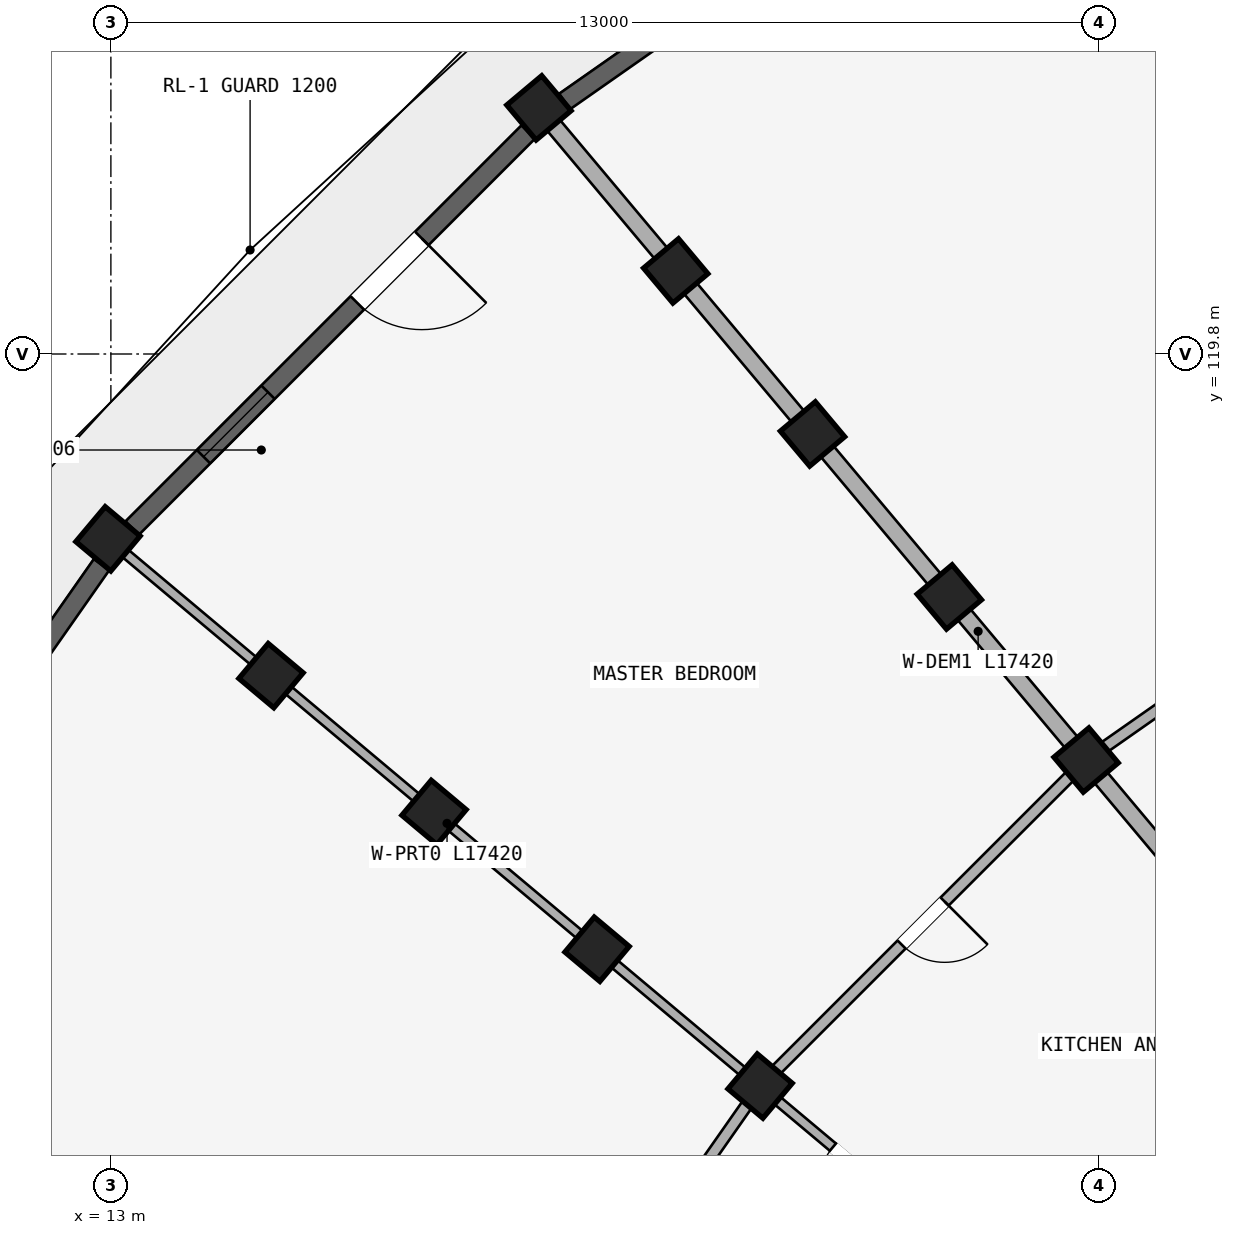
"""IFC4 building model, lengths in metres.
Left out: names, types, materials, properties, quantities, classifications, styles, units other than length and angle.
Written with IfcOpenShell. Run it as: python <this file> out.ifc"""

import sys

from ifc_helpers import new_model, si_unit, direction, frame, frame_2d, origin, origin_2d, place, context, subcontext, project, spatial, rectangle, extrude, element, fill, save


model = new_model("IFC4")
c1 = context("Model", 3, precision=1e-05, world=origin(), true_north=direction((0.0, 1.0)))
c2 = subcontext(c1, "Body", "Model", "MODEL_VIEW")
j1 = project(units=[si_unit("LENGTHUNIT", "METRE"), si_unit("PLANEANGLEUNIT", "RADIAN")], contexts=[c1])
p1 = place(None, origin())
s1 = spatial("IfcSite", under=j1, at=p1, CompositionType="ELEMENT")
p2 = place(p1, origin())
s2 = spatial("IfcBuilding", under=s1, at=p2, CompositionType="ELEMENT")
p3 = place(p2, frame((0.0, 0.0, 37.05)))
s3 = spatial("IfcBuildingStorey", under=s2, at=p3, CompositionType="ELEMENT", Elevation=37.05)
for number, where, z_axis, x_axis in (
    (1, (25.831, 114.458, 0.0), (0.0, 0.0, 1.0), (0.766, 0.643, 0.0)),
    (2, (24.031, 116.603, 0.0), (0.0, 0.0, 1.0), (0.766, 0.643, 0.0)),
    (3, (22.231, 118.748, 0.0), (0.0, 0.0, 1.0), (0.766, 0.643, 0.0)),
    (4, (20.432, 120.893, 0.0), (0.0, 0.0, 1.0), (0.766, 0.643, 0.0)),
):
    element("IfcColumn", number, at=place(p3, frame(where, z_axis=z_axis, x_axis=x_axis)), inside=s3, PredefinedType="COLUMN", context=c2, shape_type="SweptSolid", body=[
        extrude(rectangle(XDim=0.6, YDim=0.6, at=origin_2d()), origin(), (0.0, 0.0, 1.0), 2.93),
    ])
p4 = place(p3, frame((18.632, 123.038, 0.0), z_axis=(0.0, 0.0, 1.0), x_axis=(0.766044443119, 0.642787609687, 0.0)))
e5 = element("IfcColumn", 5, at=p4, inside=s3, PredefinedType="COLUMN", context=c2, shape_type="SweptSolid", body=[
    extrude(rectangle(XDim=0.6, YDim=0.6, at=origin_2d()), origin(), (0.0, 0.0, 1.0), 2.97),
])
for number, where, z_axis, x_axis in (
    (6, (21.542, 110.169, 0.0), (0.0, 0.0, 1.0), (0.643, 0.766, 0.0)),
    (7, (19.397, 111.969, 0.0), (0.0, 0.0, 1.0), (0.643, 0.766, 0.0)),
    (8, (17.252, 113.769, 0.0), (0.0, 0.0, 1.0), (0.643, 0.766, 0.0)),
    (9, (15.107, 115.568, 0.0), (0.0, 0.0, 1.0), (0.643, 0.766, 0.0)),
):
    element("IfcColumn", number, at=place(p3, frame(where, z_axis=z_axis, x_axis=x_axis)), inside=s3, PredefinedType="COLUMN", context=c2, shape_type="SweptSolid", body=[
        extrude(rectangle(XDim=0.6, YDim=0.6, at=origin_2d()), origin(), (0.0, 0.0, 1.0), 2.93),
    ])
p5 = place(p3, frame((12.962, 117.368, 0.0), z_axis=(0.0, 0.0, 1.0), x_axis=(0.642787609687, 0.766044443119, 0.0)))
e10 = element("IfcColumn", 10, at=p5, inside=s3, PredefinedType="COLUMN", context=c2, shape_type="SweptSolid", body=[
    extrude(rectangle(XDim=0.6, YDim=0.6, at=origin_2d()), origin(), (0.0, 0.0, 1.0), 2.97),
])
p6 = place(p3, frame((30.073, 109.402, 0.0), z_axis=(0.0, 0.0, 1.0), x_axis=(-0.707106781187, -0.707106781187, 0.0)))
e11 = element("IfcWall", 11, at=p6, inside=s3, PredefinedType="STANDARD", context=c2, shape_type="SweptSolid", body=[
    extrude(rectangle(XDim=4.916, YDim=0.2, at=frame_2d((2.458, 0.0))), origin(), (0.0, 0.0, 1.0), 2.372),
])
p7 = place(p6, frame((1.888, 0.0, 0.0)))
e12 = element("IfcOpeningElement", 12, at=p7, cuts=e11, PredefinedType="OPENING", context=c2, shape_type="SweptSolid", body=[
    extrude(rectangle(XDim=1.14, YDim=2.15, at=frame_2d((0.57, 1.075))), frame((0.0, 0.11, 0.0), z_axis=(0.0, -1.0, 0.0), x_axis=(1.0, 0.0, 0.0)), (0.0, 0.0, 1.0), 0.22),
])
p8 = place(p3, frame((34.05, 112.309, 0.0), z_axis=(0.0, 0.0, 1.0), x_axis=(-0.499997843263, 0.866026648973, 0.0)))
e13 = element("IfcWall", 13, at=p8, inside=s3, PredefinedType="PARTITIONING", context=c2, shape_type="SweptSolid", body=[
    extrude(rectangle(XDim=17.42, YDim=0.125, at=frame_2d((8.71, 0.0))), origin(), (0.0, 0.0, 1.0), 2.372),
])
p9 = place(p8, frame((4.45, 0.0, 0.0)))
e14 = element("IfcOpeningElement", 14, at=p9, cuts=e13, PredefinedType="OPENING", context=c2, shape_type="SweptSolid", body=[
    extrude(rectangle(XDim=0.8, YDim=2.1, at=frame_2d((0.4, 1.05))), frame((0.0, 0.073, 0.0), z_axis=(0.0, -1.0, 0.0), x_axis=(1.0, 0.0, 0.0)), (0.0, 0.0, 1.0), 0.145),
])
p10 = place(p3, frame((30.009, 109.479, 0.0), z_axis=(0.0, 0.0, 1.0), x_axis=(-0.642784757967, 0.766046835987, 0.0)))
e15 = element("IfcWall", 15, at=p10, inside=s3, PredefinedType="STANDARD", context=c2, shape_type="SweptSolid", body=[
    extrude(rectangle(XDim=17.42, YDim=0.22, at=frame_2d((8.71, 0.0))), origin(), (0.0, 0.0, 1.0), 2.372),
])
p11 = place(p3, frame((26.521, 105.991, 0.0), z_axis=(0.0, 0.0, 1.0), x_axis=(-0.766046835987, 0.642784757967, 0.0)))
e16 = element("IfcWall", 16, at=p11, inside=s3, PredefinedType="PARTITIONING", context=c2, shape_type="SweptSolid", body=[
    extrude(rectangle(XDim=17.42, YDim=0.125, at=frame_2d((8.71, 0.0))), origin(), (0.0, 0.0, 1.0), 2.372),
])
p12 = place(p11, frame((4.45, 0.0, 0.0)))
e17 = element("IfcOpeningElement", 17, at=p12, cuts=e16, PredefinedType="OPENING", context=c2, shape_type="SweptSolid", body=[
    extrude(rectangle(XDim=0.8, YDim=2.1, at=frame_2d((0.4, 1.05))), frame((0.0, 0.073, 0.0), z_axis=(0.0, -1.0, 0.0), x_axis=(1.0, 0.0, 0.0)), (0.0, 0.0, 1.0), 0.145),
])
p13 = place(p3, frame((23.691, 101.95, 0.0), z_axis=(0.0, 0.0, 1.0), x_axis=(-0.866026648973, 0.499997843263, 0.0)))
e18 = element("IfcWall", 18, at=p13, inside=s3, PredefinedType="STANDARD", context=c2, shape_type="SweptSolid", body=[
    extrude(rectangle(XDim=17.42, YDim=0.22, at=frame_2d((8.71, 0.0))), origin(), (0.0, 0.0, 1.0), 2.372),
])
p14 = place(p3, frame((30.8, 117.938, 0.0), z_axis=(0.0, 0.0, 1.0), x_axis=(-0.81913926159, -0.573594691504, 0.0)))
e19 = element("IfcWall", 19, at=p14, inside=s3, PredefinedType="PLUMBINGWALL", context=c2, shape_type="SweptSolid", body=[
    extrude(rectangle(XDim=6.066, YDim=0.15, at=frame_2d((3.033, 0.0))), origin(), (0.0, 0.0, 1.0), 2.372),
])
p15 = place(p14, frame((2.653, 0.0, 0.0)))
e20 = element("IfcOpeningElement", 20, at=p15, cuts=e19, PredefinedType="OPENING", context=c2, shape_type="SweptSolid", body=[
    extrude(rectangle(XDim=0.76, YDim=2.05, at=frame_2d((0.38, 1.025))), frame((0.0, 0.085, 0.0), z_axis=(0.0, -1.0, 0.0), x_axis=(1.0, 0.0, 0.0)), (0.0, 0.0, 1.0), 0.17),
])
p16 = place(p3, frame((25.831, 114.458, 0.0), z_axis=(0.0, 0.0, 1.0), x_axis=(-0.707106781187, -0.707106781187, 0.0)))
e21 = element("IfcWall", 21, at=p16, inside=s3, PredefinedType="PLUMBINGWALL", context=c2, shape_type="SweptSolid", body=[
    extrude(rectangle(XDim=6.066, YDim=0.15, at=frame_2d((3.033, 0.0))), origin(), (0.0, 0.0, 1.0), 2.372),
])
p17 = place(p16, frame((2.633, 0.0, 0.0)))
e22 = element("IfcOpeningElement", 22, at=p17, cuts=e21, PredefinedType="OPENING", context=c2, shape_type="SweptSolid", body=[
    extrude(rectangle(XDim=0.8, YDim=2.1, at=frame_2d((0.4, 1.05))), frame((0.0, 0.085, 0.0), z_axis=(0.0, -1.0, 0.0), x_axis=(1.0, 0.0, 0.0)), (0.0, 0.0, 1.0), 0.17),
])
p18 = place(p3, frame((21.542, 110.169, 0.0), z_axis=(0.0, 0.0, 1.0), x_axis=(-0.573594691504, -0.81913926159, 0.0)))
e23 = element("IfcWall", 23, at=p18, inside=s3, PredefinedType="PLUMBINGWALL", context=c2, shape_type="SweptSolid", body=[
    extrude(rectangle(XDim=6.066, YDim=0.15, at=frame_2d((3.033, 0.0))), origin(), (0.0, 0.0, 1.0), 2.372),
])
p19 = place(p18, frame((2.613, 0.0, 0.0)))
e24 = element("IfcOpeningElement", 24, at=p19, cuts=e23, PredefinedType="OPENING", context=c2, shape_type="SweptSolid", body=[
    extrude(rectangle(XDim=0.84, YDim=2.1, at=frame_2d((0.42, 1.05))), frame((0.0, 0.085, 0.0), z_axis=(0.0, -1.0, 0.0), x_axis=(1.0, 0.0, 0.0)), (0.0, 0.0, 1.0), 0.17),
])
p20 = place(p3, frame((25.005, 127.348, 0.0), z_axis=(0.0, 0.0, 1.0), x_axis=(-0.819147839112, -0.573582441919, 0.0)))
e25 = element("IfcWall", 25, at=p20, inside=s3, PredefinedType="STANDARD", context=c2, shape_type="SweptSolid", body=[
    extrude(rectangle(XDim=7.367, YDim=0.25, at=frame_2d((3.684, 0.0))), origin(), (0.0, 0.0, 1.0), 2.412),
])
p21 = place(p20, frame((2.783, 0.0, 0.562)))
e26 = element("IfcOpeningElement", 26, at=p21, cuts=e25, PredefinedType="OPENING", context=c2, shape_type="SweptSolid", body=[
    extrude(rectangle(XDim=1.8, YDim=1.65, at=frame_2d((0.9, 0.825))), frame((0.0, 0.135, 0.0), z_axis=(0.0, -1.0, 0.0), x_axis=(1.0, 0.0, 0.0)), (0.0, 0.0, 1.0), 0.27),
])
p22 = place(p3, frame((18.49, 122.719, 0.0), z_axis=(0.0, 0.0, 1.0), x_axis=(-0.707106781187, -0.707106781187, 0.0)))
e27 = element("IfcWall", 27, at=p22, inside=s3, PredefinedType="STANDARD", context=c2, shape_type="SweptSolid", body=[
    extrude(rectangle(XDim=7.367, YDim=0.25, at=frame_2d((3.684, 0.0))), origin(), (0.0, 0.0, 1.0), 2.412),
])
p23 = place(p22, frame((4.84, 0.0, 0.412)))
e28 = element("IfcOpeningElement", 28, at=p23, cuts=e27, PredefinedType="OPENING", context=c2, shape_type="SweptSolid", body=[
    extrude(rectangle(XDim=1.2, YDim=1.5, at=frame_2d((0.6, 0.75))), frame((0.0, 0.135, 0.0), z_axis=(0.0, -1.0, 0.0), x_axis=(1.0, 0.0, 0.0)), (0.0, 0.0, 1.0), 0.27),
])
p24 = place(p22, frame((1.979, 0.0, 0.0)))
e29 = element("IfcOpeningElement", 29, at=p24, cuts=e27, PredefinedType="OPENING", context=c2, shape_type="SweptSolid", body=[
    extrude(rectangle(XDim=1.2, YDim=2.15, at=frame_2d((0.6, 1.075))), frame((0.0, 0.135, 0.0), z_axis=(0.0, -1.0, 0.0), x_axis=(1.0, 0.0, 0.0)), (0.0, 0.0, 1.0), 0.27),
])
p25 = place(p3, frame((12.878, 117.03, 0.0), z_axis=(0.0, 0.0, 1.0), x_axis=(-0.573582441919, -0.819147839112, 0.0)))
e30 = element("IfcWall", 30, at=p25, inside=s3, PredefinedType="STANDARD", context=c2, shape_type="SweptSolid", body=[
    extrude(rectangle(XDim=7.367, YDim=0.25, at=frame_2d((3.684, 0.0))), origin(), (0.0, 0.0, 1.0), 2.412),
])
p26 = place(p25, frame((2.708, 0.0, 0.362)))
e31 = element("IfcOpeningElement", 31, at=p26, cuts=e30, PredefinedType="OPENING", context=c2, shape_type="SweptSolid", body=[
    extrude(rectangle(XDim=1.95, YDim=1.85, at=frame_2d((0.975, 0.925))), frame((0.0, 0.135, 0.0), z_axis=(0.0, -1.0, 0.0), x_axis=(1.0, 0.0, 0.0)), (0.0, 0.0, 1.0), 0.27),
])
p27 = place(p23, origin())
e32 = element("IfcWindow", 32, at=p27, inside=s3, PartitioningType="SINGLE_PANEL", PredefinedType="WINDOW", context=c2, shape_type="SweptSolid", body=[
    extrude(rectangle(XDim=1.2, YDim=1.5, at=frame_2d((0.6, 0.75))), frame((0.0, 0.03, 0.0), z_axis=(0.0, -1.0, 0.0), x_axis=(1.0, 0.0, 0.0)), (0.0, 0.0, 1.0), 0.06),
])
fill(e28, e32)
p28 = place(p12, frame((0.8, 0.0, 0.0), z_axis=(0.0, 0.0, 1.0), x_axis=(-1.0, 0.0, 0.0)))
e33 = element("IfcDoor", 33, at=p28, inside=s3, OperationType="SINGLE_SWING_RIGHT", PredefinedType="DOOR", context=c2, shape_type="SweptSolid", body=[
    extrude(rectangle(XDim=0.8, YDim=2.1, at=frame_2d((0.4, 1.05))), frame((0.0, 0.025, 0.0), z_axis=(0.0, -1.0, 0.0), x_axis=(1.0, 0.0, 0.0)), (0.0, 0.0, 1.0), 0.05),
])
fill(e17, e33)
p29 = place(p17, frame((0.8, 0.0, 0.0), z_axis=(0.0, 0.0, 1.0), x_axis=(-1.0, 0.0, 0.0)))
e34 = element("IfcDoor", 34, at=p29, inside=s3, OperationType="SINGLE_SWING_RIGHT", PredefinedType="DOOR", context=c2, shape_type="SweptSolid", body=[
    extrude(rectangle(XDim=0.8, YDim=2.1, at=frame_2d((0.4, 1.05))), frame((0.0, 0.025, 0.0), z_axis=(0.0, -1.0, 0.0), x_axis=(1.0, 0.0, 0.0)), (0.0, 0.0, 1.0), 0.05),
])
fill(e22, e34)
p30 = place(p24, frame((1.2, 0.0, 0.0), z_axis=(0.0, 0.0, 1.0), x_axis=(-1.0, 0.0, 0.0)))
e35 = element("IfcDoor", 35, at=p30, inside=s3, OperationType="SINGLE_SWING_RIGHT", PredefinedType="DOOR", context=c2, shape_type="SweptSolid", body=[
    extrude(rectangle(XDim=1.2, YDim=2.15, at=frame_2d((0.6, 1.075))), frame((0.0, 0.025, 0.0), z_axis=(0.0, -1.0, 0.0), x_axis=(1.0, 0.0, 0.0)), (0.0, 0.0, 1.0), 0.05),
])
fill(e29, e35)
save(model, sys.argv[1])
